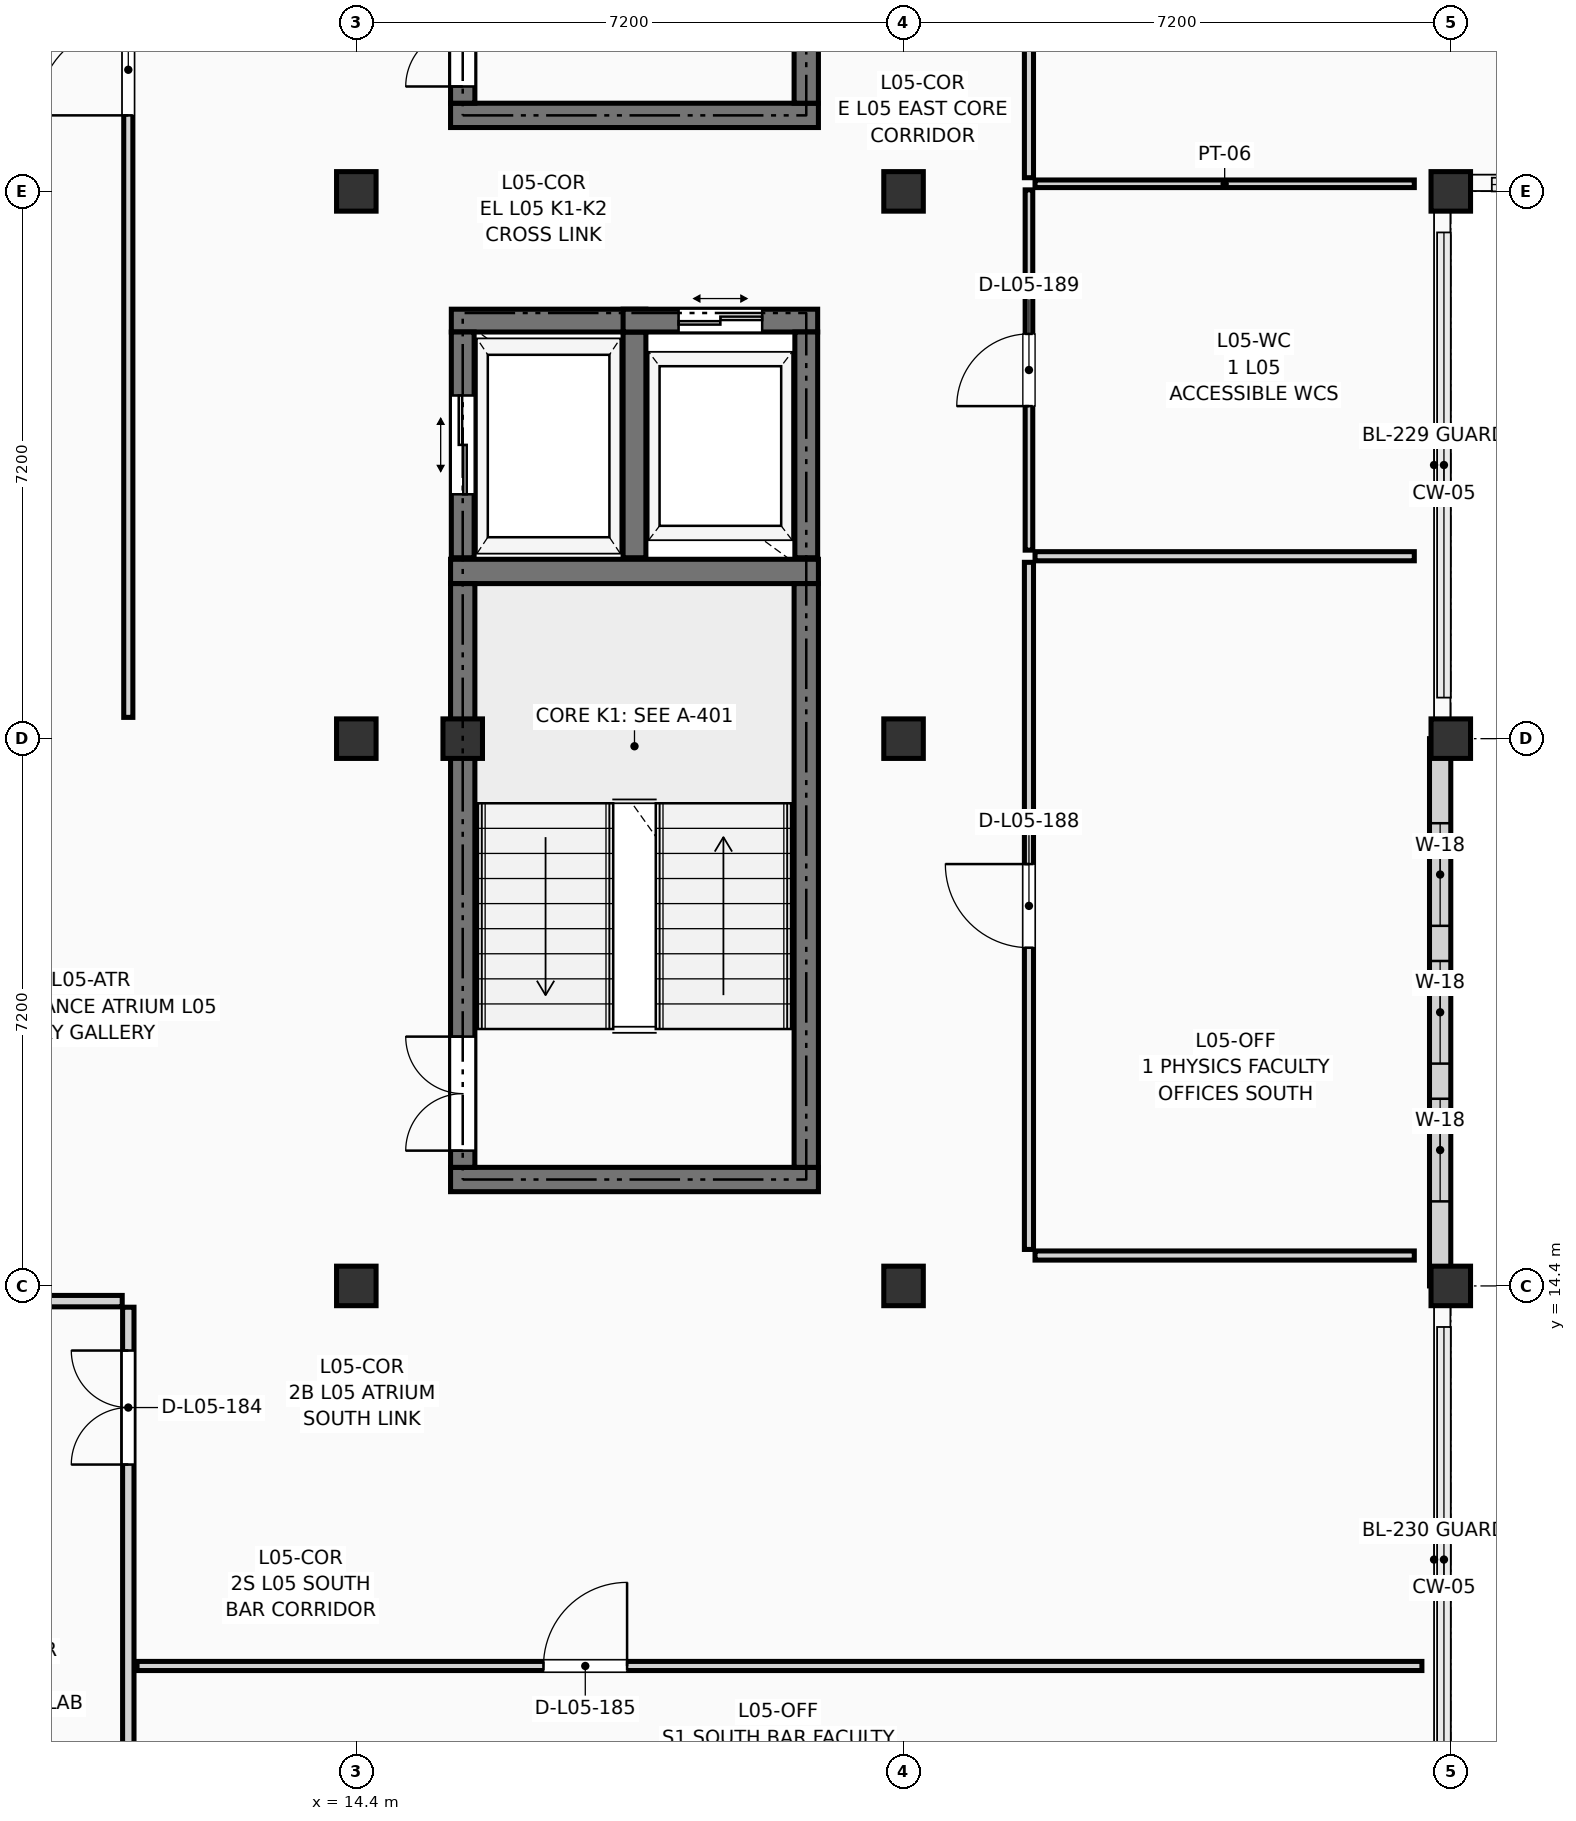
"""IFC4 building model, lengths in metres.
Left out: names, types, materials, properties, quantities, classifications, styles, units other than length and angle.
Written with IfcOpenShell. Run it as: python <this file> out.ifc"""

import sys

from ifc_helpers import new_model, si_unit, direction, frame, frame_2d, origin, origin_2d, place, context, subcontext, project, spatial, rectangle, extrude, element, fill, save


model = new_model("IFC4")
c1 = context("Model", 3, precision=1e-05, world=origin(), true_north=direction((0.0, 1.0)))
c2 = subcontext(c1, "Body", "Model", "MODEL_VIEW")
j1 = project(units=[si_unit("LENGTHUNIT", "METRE"), si_unit("PLANEANGLEUNIT", "RADIAN")], contexts=[c1])
p1 = place(None, origin())
s1 = spatial("IfcSite", under=j1, at=p1, CompositionType="ELEMENT")
p2 = place(p1, origin())
s2 = spatial("IfcBuilding", under=s1, at=p2, CompositionType="ELEMENT")
p3 = place(p2, frame((0.0, 0.0, 19.35)))
s3 = spatial("IfcBuildingStorey", under=s2, at=p3, CompositionType="ELEMENT", Elevation=19.35)
for number, where, z_axis, x_axis in (
    (1, (14.4, 14.4, 0.0), (0.0, 0.0, 1.0), (1.0, 0.0, 0.0)),
    (2, (14.4, 21.6, 0.0), (0.0, 0.0, 1.0), (1.0, 0.0, 0.0)),
    (3, (14.4, 28.8, 0.0), (0.0, 0.0, 1.0), (1.0, 0.0, 0.0)),
    (4, (15.8, 21.6, 0.0), (0.0, 0.0, 1.0), (1.0, 0.0, 0.0)),
    (5, (21.6, 14.4, 0.0), (0.0, 0.0, 1.0), (1.0, 0.0, 0.0)),
    (6, (21.6, 21.6, 0.0), (0.0, 0.0, 1.0), (1.0, 0.0, 0.0)),
    (7, (21.6, 28.8, 0.0), (0.0, 0.0, 1.0), (1.0, 0.0, 0.0)),
    (8, (28.8, 14.4, 0.0), (0.0, 0.0, 1.0), (1.0, 0.0, 0.0)),
    (9, (28.8, 21.6, 0.0), (0.0, 0.0, 1.0), (1.0, 0.0, 0.0)),
    (10, (28.8, 28.8, 0.0), (0.0, 0.0, 1.0), (1.0, 0.0, 0.0)),
):
    element("IfcColumn", number, at=place(p3, frame(where, z_axis=z_axis, x_axis=x_axis)), inside=s3, PredefinedType="COLUMN", context=c2, shape_type="SweptSolid", body=[
        extrude(rectangle(XDim=0.52, YDim=0.52, at=origin_2d()), origin(), (0.0, 0.0, 1.0), 3.6),
    ])
p4 = place(p3, frame((28.66, 14.4, 0.0), z_axis=(0.0, 0.0, 1.0), x_axis=(0.0, 1.0, 0.0)))
e11 = element("IfcWall", 11, at=p4, inside=s3, PredefinedType="SOLIDWALL", context=c2, shape_type="SweptSolid", body=[
    extrude(rectangle(XDim=7.2, YDim=0.28, at=frame_2d((3.6, 0.0))), origin(), (0.0, 0.0, 1.0), 2.84),
])
p5 = place(p4, frame((1.113, 0.0, 0.18)))
e12 = element("IfcOpeningElement", 12, at=p5, cuts=e11, PredefinedType="OPENING", context=c2, shape_type="SweptSolid", body=[
    extrude(rectangle(XDim=1.35, YDim=2.45, at=frame_2d((0.675, 1.225))), frame((0.0, 0.152, 0.0), z_axis=(0.0, -1.0, 0.0), x_axis=(1.0, 0.0, 0.0)), (0.0, 0.0, 1.0), 0.304),
])
p6 = place(p4, frame((2.925, 0.0, 0.18)))
e13 = element("IfcOpeningElement", 13, at=p6, cuts=e11, PredefinedType="OPENING", context=c2, shape_type="SweptSolid", body=[
    extrude(rectangle(XDim=1.35, YDim=2.45, at=frame_2d((0.675, 1.225))), frame((0.0, 0.152, 0.0), z_axis=(0.0, -1.0, 0.0), x_axis=(1.0, 0.0, 0.0)), (0.0, 0.0, 1.0), 0.304),
])
p7 = place(p4, frame((4.738, 0.0, 0.18)))
e14 = element("IfcOpeningElement", 14, at=p7, cuts=e11, PredefinedType="OPENING", context=c2, shape_type="SweptSolid", body=[
    extrude(rectangle(XDim=1.35, YDim=2.45, at=frame_2d((0.675, 1.225))), frame((0.0, 0.152, 0.0), z_axis=(0.0, -1.0, 0.0), x_axis=(1.0, 0.0, 0.0)), (0.0, 0.0, 1.0), 0.304),
])
for number, where, z_axis, x_axis in (
    (15, (15.64, 15.8, 0.0), (0.0, 0.0, 1.0), (1.0, 0.0, 0.0)),
    (16, (15.64, 23.8, 0.0), (0.0, 0.0, 1.0), (1.0, 0.0, 0.0)),
):
    element("IfcWall", number, at=place(p3, frame(where, z_axis=z_axis, x_axis=x_axis)), inside=s3, PredefinedType="SHEAR", context=c2, shape_type="SweptSolid", body=[
        extrude(rectangle(XDim=4.84, YDim=0.32, at=frame_2d((2.42, 0.0))), origin(), (0.0, 0.0, 1.0), 3.39),
    ])
p8 = place(p3, frame((15.8, 15.96, 0.0), z_axis=(0.0, 0.0, 1.0), x_axis=(0.0, 1.0, 0.0)))
e17 = element("IfcWall", 17, at=p8, inside=s3, PredefinedType="SHEAR", context=c2, shape_type="SweptSolid", body=[
    extrude(rectangle(XDim=7.68, YDim=0.32, at=frame_2d((3.84, 0.0))), origin(), (0.0, 0.0, 1.0), 3.39),
])
p9 = place(p8, frame((0.22, 0.0, 0.0)))
e18 = element("IfcOpeningElement", 18, at=p9, cuts=e17, PredefinedType="OPENING", context=c2, shape_type="SweptSolid", body=[
    extrude(rectangle(XDim=1.5, YDim=2.2, at=frame_2d((0.75, 1.1))), frame((0.0, 0.172, 0.0), z_axis=(0.0, -1.0, 0.0), x_axis=(1.0, 0.0, 0.0)), (0.0, 0.0, 1.0), 0.344),
])
p10 = place(p3, frame((20.32, 15.96, 0.0), z_axis=(0.0, 0.0, 1.0), x_axis=(0.0, 1.0, 0.0)))
e19 = element("IfcWall", 19, at=p10, inside=s3, PredefinedType="SHEAR", context=c2, shape_type="SweptSolid", body=[
    extrude(rectangle(XDim=7.68, YDim=0.32, at=frame_2d((3.84, 0.0))), origin(), (0.0, 0.0, 1.0), 3.39),
])
p11 = place(p3, frame((15.64, 29.8, 0.0), z_axis=(0.0, 0.0, 1.0), x_axis=(1.0, 0.0, 0.0)))
e20 = element("IfcWall", 20, at=p11, inside=s3, PredefinedType="SHEAR", context=c2, shape_type="SweptSolid", body=[
    extrude(rectangle(XDim=4.84, YDim=0.32, at=frame_2d((2.42, 0.0))), origin(), (0.0, 0.0, 1.0), 3.39),
])
p12 = place(p3, frame((15.8, 29.96, 0.0), z_axis=(0.0, 0.0, 1.0), x_axis=(0.0, 1.0, 0.0)))
e21 = element("IfcWall", 21, at=p12, inside=s3, PredefinedType="SHEAR", context=c2, shape_type="SweptSolid", body=[
    extrude(rectangle(XDim=7.68, YDim=0.32, at=frame_2d((3.84, 0.0))), origin(), (0.0, 0.0, 1.0), 3.39),
])
p13 = place(p12, frame((0.22, 0.0, 0.0)))
e22 = element("IfcOpeningElement", 22, at=p13, cuts=e21, PredefinedType="OPENING", context=c2, shape_type="SweptSolid", body=[
    extrude(rectangle(XDim=1.5, YDim=2.2, at=frame_2d((0.75, 1.1))), frame((0.0, 0.172, 0.0), z_axis=(0.0, -1.0, 0.0), x_axis=(1.0, 0.0, 0.0)), (0.0, 0.0, 1.0), 0.344),
])
p14 = place(p3, frame((20.32, 29.96, 0.0), z_axis=(0.0, 0.0, 1.0), x_axis=(0.0, 1.0, 0.0)))
e23 = element("IfcWall", 23, at=p14, inside=s3, PredefinedType="SHEAR", context=c2, shape_type="SweptSolid", body=[
    extrude(rectangle(XDim=7.68, YDim=0.32, at=frame_2d((3.84, 0.0))), origin(), (0.0, 0.0, 1.0), 3.39),
])
p15 = place(p3, frame((15.65, 27.1, 0.0), z_axis=(0.0, 0.0, 1.0), x_axis=(1.0, 0.0, 0.0)))
e24 = element("IfcWall", 24, at=p15, inside=s3, PredefinedType="SHEAR", context=c2, shape_type="SweptSolid", body=[
    extrude(rectangle(XDim=2.56, YDim=0.3, at=frame_2d((1.28, 0.0))), origin(), (0.0, 0.0, 1.0), 3.39),
])
p16 = place(p3, frame((15.8, 23.98, 0.0), z_axis=(0.0, 0.0, 1.0), x_axis=(0.0, 1.0, 0.0)))
e25 = element("IfcWall", 25, at=p16, inside=s3, PredefinedType="SHEAR", context=c2, shape_type="SweptSolid", body=[
    extrude(rectangle(XDim=2.97, YDim=0.3, at=frame_2d((1.485, 0.0))), origin(), (0.0, 0.0, 1.0), 3.39),
])
p17 = place(p16, frame((0.835, 0.0, 0.0)))
e26 = element("IfcOpeningElement", 26, at=p17, cuts=e25, PredefinedType="OPENING", context=c2, shape_type="SweptSolid", body=[
    extrude(rectangle(XDim=1.3, YDim=2.25, at=frame_2d((0.65, 1.125))), frame((0.0, 0.162, 0.0), z_axis=(0.0, -1.0, 0.0), x_axis=(1.0, 0.0, 0.0)), (0.0, 0.0, 1.0), 0.324),
])
p18 = place(p3, frame((18.06, 23.98, 0.0), z_axis=(0.0, 0.0, 1.0), x_axis=(0.0, 1.0, 0.0)))
e27 = element("IfcWall", 27, at=p18, inside=s3, PredefinedType="SHEAR", context=c2, shape_type="SweptSolid", body=[
    extrude(rectangle(XDim=2.97, YDim=0.3, at=frame_2d((1.485, 0.0))), origin(), (0.0, 0.0, 1.0), 3.39),
])
p19 = place(p3, frame((17.91, 27.1, 0.0), z_axis=(0.0, 0.0, 1.0), x_axis=(1.0, 0.0, 0.0)))
e28 = element("IfcWall", 28, at=p19, inside=s3, PredefinedType="SHEAR", context=c2, shape_type="SweptSolid", body=[
    extrude(rectangle(XDim=2.56, YDim=0.3, at=frame_2d((1.28, 0.0))), origin(), (0.0, 0.0, 1.0), 3.39),
])
p20 = place(p19, frame((0.73, 0.0, 0.0)))
e29 = element("IfcOpeningElement", 29, at=p20, cuts=e28, PredefinedType="OPENING", context=c2, shape_type="SweptSolid", body=[
    extrude(rectangle(XDim=1.1, YDim=2.2, at=frame_2d((0.55, 1.1))), frame((0.0, 0.162, 0.0), z_axis=(0.0, -1.0, 0.0), x_axis=(1.0, 0.0, 0.0)), (0.0, 0.0, 1.0), 0.324),
])
p21 = place(p3, frame((20.32, 23.98, 0.0), z_axis=(0.0, 0.0, 1.0), x_axis=(0.0, 1.0, 0.0)))
e30 = element("IfcWall", 30, at=p21, inside=s3, PredefinedType="SHEAR", context=c2, shape_type="SweptSolid", body=[
    extrude(rectangle(XDim=2.97, YDim=0.3, at=frame_2d((1.485, 0.0))), origin(), (0.0, 0.0, 1.0), 3.39),
])
p22 = place(p3, frame((11.4, 7.53, 0.0), z_axis=(0.0, 0.0, 1.0), x_axis=(0.0, 1.0, 0.0)))
e31 = element("IfcWall", 31, at=p22, inside=s3, PredefinedType="PARTITIONING", context=c2, shape_type="SweptSolid", body=[
    extrude(rectangle(XDim=6.59, YDim=0.15, at=frame_2d((3.295, 0.0))), origin(), (0.0, 0.0, 1.0), 3.375),
])
p23 = place(p22, frame((4.52, 0.0, 0.0)))
e32 = element("IfcOpeningElement", 32, at=p23, cuts=e31, PredefinedType="OPENING", context=c2, shape_type="SweptSolid", body=[
    extrude(rectangle(XDim=1.5, YDim=2.2, at=frame_2d((0.75, 1.1))), frame((0.0, 0.087, 0.0), z_axis=(0.0, -1.0, 0.0), x_axis=(1.0, 0.0, 0.0)), (0.0, 0.0, 1.0), 0.174),
])
p24 = place(p3, frame((7.58, 14.2, 0.0), z_axis=(0.0, 0.0, 1.0), x_axis=(1.0, 0.0, 0.0)))
e33 = element("IfcWall", 33, at=p24, inside=s3, PredefinedType="PARTITIONING", context=c2, shape_type="SweptSolid", body=[
    extrude(rectangle(XDim=3.74, YDim=0.15, at=frame_2d((1.87, 0.0))), origin(), (0.0, 0.0, 1.0), 2.691),
])
p25 = place(p3, frame((11.515, 9.4, 0.0), z_axis=(0.0, 0.0, 1.0), x_axis=(1.0, 0.0, 0.0)))
e34 = element("IfcWall", 34, at=p25, inside=s3, PredefinedType="PARTITIONING", context=c2, shape_type="SweptSolid", body=[
    extrude(rectangle(XDim=16.905, YDim=0.12, at=frame_2d((8.453, 0.0))), origin(), (0.0, 0.0, 1.0), 3.375),
])
p26 = place(p25, frame((5.347, 0.0, 0.0)))
e35 = element("IfcOpeningElement", 35, at=p26, cuts=e34, PredefinedType="OPENING", context=c2, shape_type="SweptSolid", body=[
    extrude(rectangle(XDim=1.1, YDim=2.15, at=frame_2d((0.55, 1.075))), frame((0.0, 0.072, 0.0), z_axis=(0.0, -1.0, 0.0), x_axis=(1.0, 0.0, 0.0)), (0.0, 0.0, 1.0), 0.144),
])
p27 = place(p3, frame((11.4, 21.88, 0.0), z_axis=(0.0, 0.0, 1.0), x_axis=(0.0, 1.0, 0.0)))
e36 = element("IfcWall", 36, at=p27, inside=s3, PredefinedType="PARTITIONING", context=c2, shape_type="SweptSolid", body=[
    extrude(rectangle(XDim=17.04, YDim=0.12, at=frame_2d((8.52, 0.0))), origin(), (0.0, 0.0, 1.0), 3.375),
])
p28 = place(p27, frame((7.92, 0.0, 0.0)))
e37 = element("IfcOpeningElement", 37, at=p28, cuts=e36, PredefinedType="OPENING", context=c2, shape_type="SweptSolid", body=[
    extrude(rectangle(XDim=1.2, YDim=2.15, at=frame_2d((0.6, 1.075))), frame((0.0, 0.072, 0.0), z_axis=(0.0, -1.0, 0.0), x_axis=(1.0, 0.0, 0.0)), (0.0, 0.0, 1.0), 0.144),
])
p29 = place(p3, frame((23.25, 14.88, 0.0), z_axis=(0.0, 0.0, 1.0), x_axis=(0.0, 1.0, 0.0)))
e38 = element("IfcWall", 38, at=p29, inside=s3, PredefinedType="PARTITIONING", context=c2, shape_type="SweptSolid", body=[
    extrude(rectangle(XDim=9.04, YDim=0.12, at=frame_2d((4.52, 0.0))), origin(), (0.0, 0.0, 1.0), 3.375),
])
p30 = place(p29, frame((3.97, 0.0, 0.0)))
e39 = element("IfcOpeningElement", 39, at=p30, cuts=e38, PredefinedType="OPENING", context=c2, shape_type="SweptSolid", body=[
    extrude(rectangle(XDim=1.1, YDim=2.15, at=frame_2d((0.55, 1.075))), frame((0.0, 0.072, 0.0), z_axis=(0.0, -1.0, 0.0), x_axis=(1.0, 0.0, 0.0)), (0.0, 0.0, 1.0), 0.144),
])
for number, where, z_axis, x_axis in (
    (40, (23.33, 14.8, 0.0), (0.0, 0.0, 1.0), (1.0, 0.0, 0.0)),
    (41, (23.33, 24.0, 0.0), (0.0, 0.0, 1.0), (1.0, 0.0, 0.0)),
):
    element("IfcWall", number, at=place(p3, frame(where, z_axis=z_axis, x_axis=x_axis)), inside=s3, PredefinedType="PARTITIONING", context=c2, shape_type="SweptSolid", body=[
        extrude(rectangle(XDim=4.99, YDim=0.12, at=frame_2d((2.495, 0.0))), origin(), (0.0, 0.0, 1.0), 3.375),
    ])
p31 = place(p3, frame((23.25, 24.08, 0.0), z_axis=(0.0, 0.0, 1.0), x_axis=(0.0, 1.0, 0.0)))
e42 = element("IfcWall", 42, at=p31, inside=s3, PredefinedType="PARTITIONING", context=c2, shape_type="SweptSolid", body=[
    extrude(rectangle(XDim=4.74, YDim=0.1, at=frame_2d((2.37, 0.0))), origin(), (0.0, 0.0, 1.0), 3.375),
])
p32 = place(p31, frame((1.895, 0.0, 0.0)))
e43 = element("IfcOpeningElement", 43, at=p32, cuts=e42, PredefinedType="OPENING", context=c2, shape_type="SweptSolid", body=[
    extrude(rectangle(XDim=0.95, YDim=2.1, at=frame_2d((0.475, 1.05))), frame((0.0, 0.062, 0.0), z_axis=(0.0, -1.0, 0.0), x_axis=(1.0, 0.0, 0.0)), (0.0, 0.0, 1.0), 0.124),
])
p33 = place(p3, frame((23.33, 28.9, 0.0), z_axis=(0.0, 0.0, 1.0), x_axis=(1.0, 0.0, 0.0)))
e44 = element("IfcWall", 44, at=p33, inside=s3, PredefinedType="PARTITIONING", context=c2, shape_type="SweptSolid", body=[
    extrude(rectangle(XDim=4.99, YDim=0.1, at=frame_2d((2.495, 0.0))), origin(), (0.0, 0.0, 1.0), 2.691),
])
p34 = place(p3, frame((23.25, 28.98, 0.0), z_axis=(0.0, 0.0, 1.0), x_axis=(0.0, 1.0, 0.0)))
e45 = element("IfcWall", 45, at=p34, inside=s3, PredefinedType="PARTITIONING", context=c2, shape_type="SweptSolid", body=[
    extrude(rectangle(XDim=13.34, YDim=0.12, at=frame_2d((6.67, 0.0))), origin(), (0.0, 0.0, 1.0), 3.375),
])
p35 = place(p34, frame((4.364, 0.0, 0.0)))
e46 = element("IfcOpeningElement", 46, at=p35, cuts=e45, PredefinedType="OPENING", context=c2, shape_type="SweptSolid", body=[
    extrude(rectangle(XDim=1.2, YDim=2.15, at=frame_2d((0.6, 1.075))), frame((0.0, 0.072, 0.0), z_axis=(0.0, -1.0, 0.0), x_axis=(1.0, 0.0, 0.0)), (0.0, 0.0, 1.0), 0.144),
])
p36 = place(p5, origin())
e47 = element("IfcWindow", 47, at=p36, inside=s3, PartitioningType="SINGLE_PANEL", PredefinedType="WINDOW", context=c2, shape_type="SweptSolid", body=[
    extrude(rectangle(XDim=1.35, YDim=2.45, at=frame_2d((0.675, 1.225))), frame((0.0, 0.03, 0.0), z_axis=(0.0, -1.0, 0.0), x_axis=(1.0, 0.0, 0.0)), (0.0, 0.0, 1.0), 0.06),
])
fill(e12, e47)
p37 = place(p6, origin())
e48 = element("IfcWindow", 48, at=p37, inside=s3, PartitioningType="SINGLE_PANEL", PredefinedType="WINDOW", context=c2, shape_type="SweptSolid", body=[
    extrude(rectangle(XDim=1.35, YDim=2.45, at=frame_2d((0.675, 1.225))), frame((0.0, 0.03, 0.0), z_axis=(0.0, -1.0, 0.0), x_axis=(1.0, 0.0, 0.0)), (0.0, 0.0, 1.0), 0.06),
])
fill(e13, e48)
p38 = place(p7, origin())
e49 = element("IfcWindow", 49, at=p38, inside=s3, PartitioningType="SINGLE_PANEL", PredefinedType="WINDOW", context=c2, shape_type="SweptSolid", body=[
    extrude(rectangle(XDim=1.35, YDim=2.45, at=frame_2d((0.675, 1.225))), frame((0.0, 0.03, 0.0), z_axis=(0.0, -1.0, 0.0), x_axis=(1.0, 0.0, 0.0)), (0.0, 0.0, 1.0), 0.06),
])
fill(e14, e49)
p39 = place(p9, origin())
e50 = element("IfcDoor", 50, at=p39, inside=s3, OperationType="DOUBLE_DOOR_SINGLE_SWING", PredefinedType="DOOR", context=c2, shape_type="SweptSolid", body=[
    extrude(rectangle(XDim=1.5, YDim=2.2, at=frame_2d((0.75, 1.1))), frame((0.0, 0.025, 0.0), z_axis=(0.0, -1.0, 0.0), x_axis=(1.0, 0.0, 0.0)), (0.0, 0.0, 1.0), 0.05),
])
fill(e18, e50)
p40 = place(p13, origin())
e51 = element("IfcDoor", 51, at=p40, inside=s3, OperationType="DOUBLE_DOOR_SINGLE_SWING", PredefinedType="DOOR", context=c2, shape_type="SweptSolid", body=[
    extrude(rectangle(XDim=1.5, YDim=2.2, at=frame_2d((0.75, 1.1))), frame((0.0, 0.025, 0.0), z_axis=(0.0, -1.0, 0.0), x_axis=(1.0, 0.0, 0.0)), (0.0, 0.0, 1.0), 0.05),
])
fill(e22, e51)
p41 = place(p17, origin())
e52 = element("IfcDoor", 52, at=p41, inside=s3, OperationType="DOUBLE_DOOR_SLIDING", PredefinedType="DOOR", context=c2, shape_type="SweptSolid", body=[
    extrude(rectangle(XDim=1.3, YDim=2.25, at=frame_2d((0.65, 1.125))), frame((0.0, 0.025, 0.0), z_axis=(0.0, -1.0, 0.0), x_axis=(1.0, 0.0, 0.0)), (0.0, 0.0, 1.0), 0.05),
])
fill(e26, e52)
p42 = place(p20, origin())
e53 = element("IfcDoor", 53, at=p42, inside=s3, OperationType="DOUBLE_DOOR_SLIDING", PredefinedType="DOOR", context=c2, shape_type="SweptSolid", body=[
    extrude(rectangle(XDim=1.1, YDim=2.2, at=frame_2d((0.55, 1.1))), frame((0.0, 0.025, 0.0), z_axis=(0.0, -1.0, 0.0), x_axis=(1.0, 0.0, 0.0)), (0.0, 0.0, 1.0), 0.05),
])
fill(e29, e53)
p43 = place(p23, origin())
e54 = element("IfcDoor", 54, at=p43, inside=s3, OperationType="DOUBLE_DOOR_SINGLE_SWING", PredefinedType="DOOR", context=c2, shape_type="SweptSolid", body=[
    extrude(rectangle(XDim=1.5, YDim=2.2, at=frame_2d((0.75, 1.1))), frame((0.0, 0.025, 0.0), z_axis=(0.0, -1.0, 0.0), x_axis=(1.0, 0.0, 0.0)), (0.0, 0.0, 1.0), 0.05),
])
fill(e32, e54)
p44 = place(p26, origin())
e55 = element("IfcDoor", 55, at=p44, inside=s3, OperationType="SINGLE_SWING_RIGHT", PredefinedType="DOOR", context=c2, shape_type="SweptSolid", body=[
    extrude(rectangle(XDim=1.1, YDim=2.15, at=frame_2d((0.55, 1.075))), frame((0.0, 0.025, 0.0), z_axis=(0.0, -1.0, 0.0), x_axis=(1.0, 0.0, 0.0)), (0.0, 0.0, 1.0), 0.05),
])
fill(e35, e55)
p45 = place(p28, origin())
e56 = element("IfcDoor", 56, at=p45, inside=s3, OperationType="SINGLE_SWING_LEFT", PredefinedType="DOOR", context=c2, shape_type="SweptSolid", body=[
    extrude(rectangle(XDim=1.2, YDim=2.15, at=frame_2d((0.6, 1.075))), frame((0.0, 0.025, 0.0), z_axis=(0.0, -1.0, 0.0), x_axis=(1.0, 0.0, 0.0)), (0.0, 0.0, 1.0), 0.05),
])
fill(e37, e56)
p46 = place(p30, origin())
e57 = element("IfcDoor", 57, at=p46, inside=s3, OperationType="SINGLE_SWING_RIGHT", PredefinedType="DOOR", context=c2, shape_type="SweptSolid", body=[
    extrude(rectangle(XDim=1.1, YDim=2.15, at=frame_2d((0.55, 1.075))), frame((0.0, 0.025, 0.0), z_axis=(0.0, -1.0, 0.0), x_axis=(1.0, 0.0, 0.0)), (0.0, 0.0, 1.0), 0.05),
])
fill(e39, e57)
p47 = place(p32, origin())
e58 = element("IfcDoor", 58, at=p47, inside=s3, OperationType="SINGLE_SWING_LEFT", PredefinedType="DOOR", context=c2, shape_type="SweptSolid", body=[
    extrude(rectangle(XDim=0.95, YDim=2.1, at=frame_2d((0.475, 1.05))), frame((0.0, 0.025, 0.0), z_axis=(0.0, -1.0, 0.0), x_axis=(1.0, 0.0, 0.0)), (0.0, 0.0, 1.0), 0.05),
])
fill(e43, e58)
save(model, sys.argv[1])
